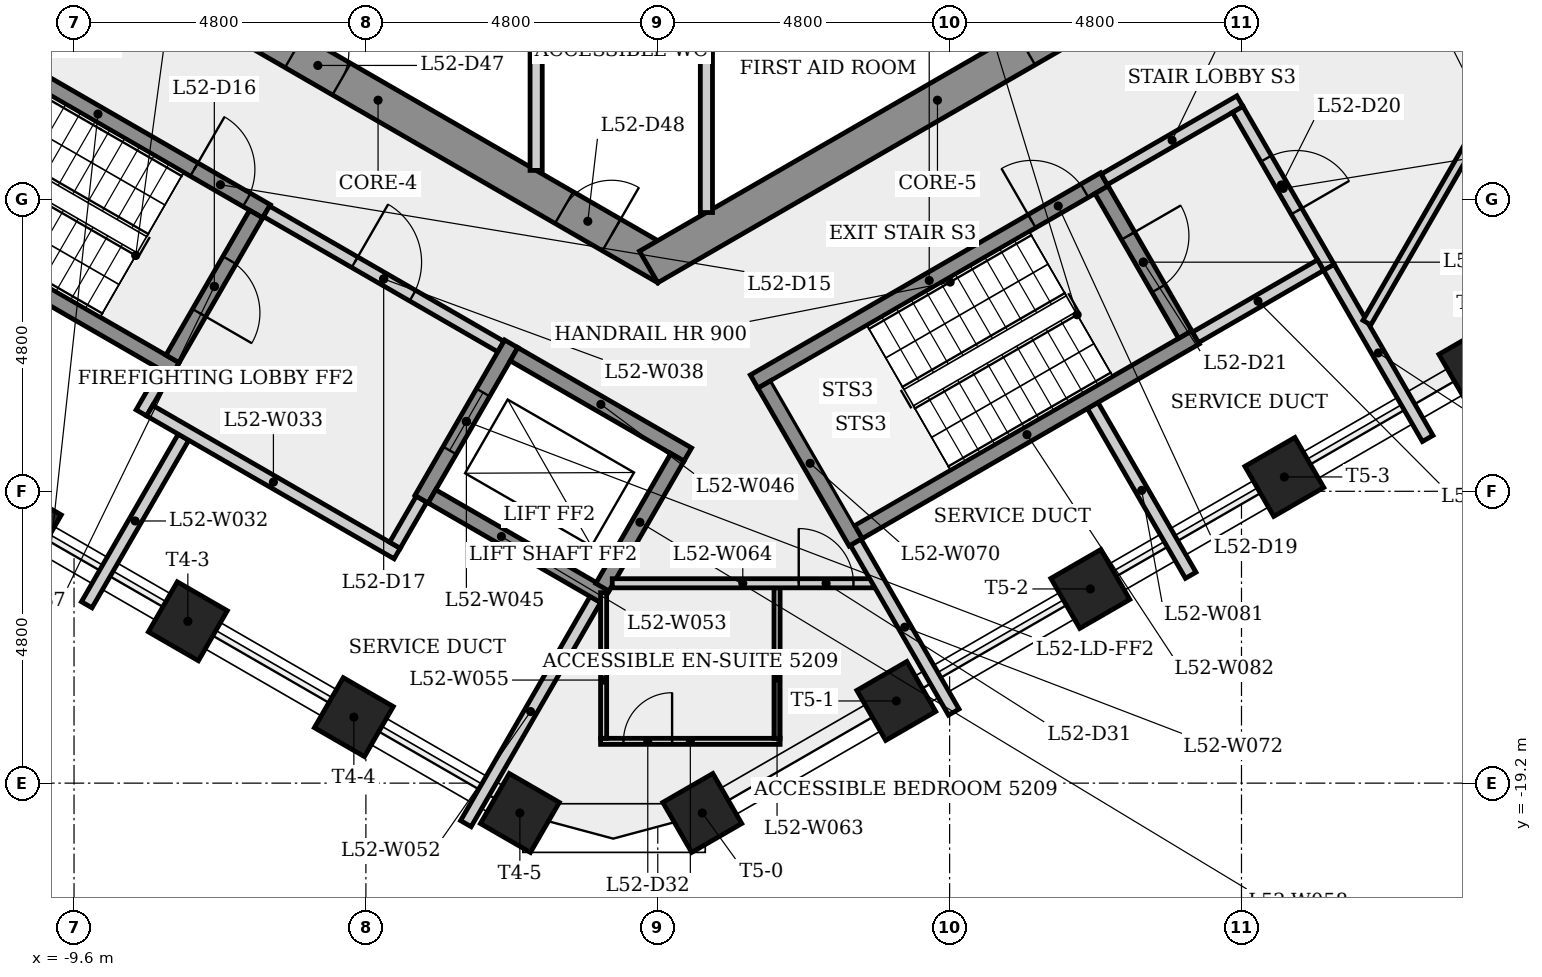
"""IFC4 building model, lengths in metres.
Left out: names, types, materials, properties, quantities, classifications, styles, units other than length and angle.
Written with IfcOpenShell. Run it as: python <this file> out.ifc"""

import sys

from ifc_helpers import new_model, si_unit, direction, frame, frame_2d, origin, origin_2d, place, context, subcontext, project, spatial, rectangle, extrude, element, fill, save


model = new_model("IFC4")
c1 = context("Model", 3, precision=1e-05, world=origin(), true_north=direction((0.0, 1.0)))
c2 = subcontext(c1, "Body", "Model", "MODEL_VIEW")
j1 = project(units=[si_unit("LENGTHUNIT", "METRE"), si_unit("PLANEANGLEUNIT", "RADIAN")], contexts=[c1])
p1 = place(None, origin())
s1 = spatial("IfcSite", under=j1, at=p1, CompositionType="ELEMENT")
p2 = place(p1, origin())
s2 = spatial("IfcBuilding", under=s1, at=p2, CompositionType="ELEMENT")
p3 = place(p2, frame((0.0, 0.0, 194.7)))
s3 = spatial("IfcBuildingStorey", under=s2, at=p3, CompositionType="ELEMENT", Elevation=194.7)
p4 = place(p3, frame((-9.35, -5.225, 0.0), z_axis=(0.0, 0.0, 1.0), x_axis=(0.866023993627, -0.500002442456, 0.0)))
e1 = element("IfcWall", 1, at=p4, inside=s3, PredefinedType="SHEAR", context=c2, shape_type="SweptSolid", body=[
    extrude(rectangle(XDim=10.97, YDim=0.6, at=frame_2d((5.485, 0.0))), origin(), (0.0, 0.0, 1.0), 4.0),
])
p5 = place(p4, frame((3.891, 0.0, 0.0)))
e2 = element("IfcOpeningElement", 2, at=p5, cuts=e1, PredefinedType="OPENING", context=c2, shape_type="SweptSolid", body=[
    extrude(rectangle(XDim=0.9, YDim=2.1, at=frame_2d((0.45, 1.05))), frame((0.0, 0.31, 0.0), z_axis=(0.0, -1.0, 0.0), x_axis=(1.0, 0.0, 0.0)), (0.0, 0.0, 1.0), 0.62),
])
p6 = place(p4, frame((9.018, 0.0, 0.0)))
e3 = element("IfcOpeningElement", 3, at=p6, cuts=e1, PredefinedType="OPENING", context=c2, shape_type="SweptSolid", body=[
    extrude(rectangle(XDim=0.9, YDim=2.1, at=frame_2d((0.45, 1.05))), frame((0.0, 0.31, 0.0), z_axis=(0.0, -1.0, 0.0), x_axis=(1.0, 0.0, 0.0)), (0.0, 0.0, 1.0), 0.62),
])
p7 = place(p3, frame((-0.15, -10.71, 0.0), z_axis=(0.0, 0.0, 1.0), x_axis=(0.866023993627, 0.500002442456, 0.0)))
e4 = element("IfcWall", 4, at=p7, inside=s3, PredefinedType="SHEAR", context=c2, shape_type="SweptSolid", body=[
    extrude(rectangle(XDim=10.97, YDim=0.6, at=frame_2d((5.485, 0.0))), origin(), (0.0, 0.0, 1.0), 4.0),
])
p8 = place(p7, frame((7.166, 0.0, 0.0)))
e5 = element("IfcOpeningElement", 5, at=p8, cuts=e4, PredefinedType="OPENING", context=c2, shape_type="SweptSolid", body=[
    extrude(rectangle(XDim=0.9, YDim=2.1, at=frame_2d((0.45, 1.05))), frame((0.0, 0.31, 0.0), z_axis=(0.0, -1.0, 0.0), x_axis=(1.0, 0.0, 0.0)), (0.0, 0.0, 1.0), 0.62),
])
for number, where, z_axis, x_axis in (
    (6, (-10.458, -14.962, 0.0), (0.0, 0.0, 1.0), (-0.5, -0.866, 0.0)),
    (7, (-7.728, -16.538, 0.0), (0.0, 0.0, 1.0), (-0.5, -0.866, 0.0)),
    (8, (-4.998, -18.114, 0.0), (0.0, 0.0, 1.0), (-0.5, -0.866, 0.0)),
    (9, (-2.268, -19.691, 0.0), (0.0, 0.0, 1.0), (-0.5, -0.866, 0.0)),
    (10, (0.732, -19.691, 0.0), (0.0, 0.0, 1.0), (0.5, -0.866, 0.0)),
    (11, (3.923, -17.848, 0.0), (0.0, 0.0, 1.0), (0.5, -0.866, 0.0)),
    (12, (7.114, -16.006, 0.0), (0.0, 0.0, 1.0), (0.5, -0.866, 0.0)),
    (13, (10.305, -14.164, 0.0), (0.0, 0.0, 1.0), (0.5, -0.866, 0.0)),
    (14, (13.496, -12.322, 0.0), (0.0, 0.0, 1.0), (0.5, -0.866, 0.0)),
):
    element("IfcColumn", number, at=place(p3, frame(where, z_axis=z_axis, x_axis=x_axis)), inside=s3, PredefinedType="COLUMN", context=c2, shape_type="SweptSolid", body=[
        extrude(rectangle(XDim=0.95, YDim=0.95, at=origin_2d()), origin(), (0.0, 0.0, 1.0), 4.0),
    ])
p9 = place(p3, frame((-11.977, -6.595, 0.0), z_axis=(0.0, 0.0, 1.0), x_axis=(0.866025499775, -0.499999833739, 0.0)))
e15 = element("IfcWall", 15, at=p9, inside=s3, PredefinedType="SHEAR", context=c2, shape_type="SweptSolid", body=[
    extrude(rectangle(XDim=6.4, YDim=0.25, at=frame_2d((3.2, 0.0))), origin(), (0.0, 0.0, 1.0), 3.65),
])
p10 = place(p9, frame((5.025, 0.0, 0.0)))
e16 = element("IfcOpeningElement", 16, at=p10, cuts=e15, PredefinedType="OPENING", context=c2, shape_type="SweptSolid", body=[
    extrude(rectangle(XDim=1.0, YDim=2.1, at=frame_2d((0.5, 1.05))), frame((0.0, 0.135, 0.0), z_axis=(0.0, -1.0, 0.0), x_axis=(1.0, 0.0, 0.0)), (0.0, 0.0, 1.0), 0.27),
])
p11 = place(p3, frame((-8.493, -13.11, 0.0), z_axis=(0.0, 0.0, 1.0), x_axis=(0.500067724834, 0.865986299303, 0.0)))
e17 = element("IfcWall", 17, at=p11, inside=s3, PredefinedType="PLUMBINGWALL", context=c2, shape_type="SweptSolid", body=[
    extrude(rectangle(XDim=0.775, YDim=0.2, at=frame_2d((0.388, 0.0))), origin(), (0.0, 0.0, 1.0), 3.65),
])
p12 = place(p3, frame((-7.935, -12.393, 0.0), z_axis=(0.0, 0.0, 1.0), x_axis=(-0.866025499775, 0.499999833739, 0.0)))
e18 = element("IfcWall", 18, at=p12, inside=s3, PredefinedType="SHEAR", context=c2, shape_type="SweptSolid", body=[
    extrude(rectangle(XDim=6.4, YDim=0.25, at=frame_2d((3.2, 0.0))), origin(), (0.0, 0.0, 1.0), 3.65),
])
p13 = place(p3, frame((-7.8, -13.51, 0.0), z_axis=(0.0, 0.0, 1.0), x_axis=(-0.500016846771, -0.866015677078, 0.0)))
e19 = element("IfcWall", 19, at=p13, inside=s3, PredefinedType="PLUMBINGWALL", context=c2, shape_type="SweptSolid", body=[
    extrude(rectangle(XDim=3.183, YDim=0.2, at=frame_2d((1.591, 0.0))), origin(), (0.0, 0.0, 1.0), 3.65),
])
p14 = place(p3, frame((-8.356, -13.073, 0.0), z_axis=(0.0, 0.0, 1.0), x_axis=(0.866038532462, -0.499977259774, 0.0)))
e20 = element("IfcWall", 20, at=p14, inside=s3, PredefinedType="PLUMBINGWALL", context=c2, shape_type="SweptSolid", body=[
    extrude(rectangle(XDim=4.7, YDim=0.2, at=frame_2d((2.35, 0.0))), origin(), (0.0, 0.0, 1.0), 3.65),
])
p15 = place(p3, frame((-6.605, -9.841, 0.0), z_axis=(0.0, 0.0, 1.0), x_axis=(-0.499996545922, -0.866027397988, 0.0)))
e21 = element("IfcWall", 21, at=p15, inside=s3, PredefinedType="SHEAR", context=c2, shape_type="SweptSolid", body=[
    extrude(rectangle(XDim=2.75, YDim=0.25, at=frame_2d((1.375, 0.0))), origin(), (0.0, 0.0, 1.0), 3.65),
])
p16 = place(p15, frame((0.875, 0.0, 0.0)))
e22 = element("IfcOpeningElement", 22, at=p16, cuts=e21, PredefinedType="OPENING", context=c2, shape_type="SweptSolid", body=[
    extrude(rectangle(XDim=1.0, YDim=2.1, at=frame_2d((0.5, 1.05))), frame((0.0, 0.135, 0.0), z_axis=(0.0, -1.0, 0.0), x_axis=(1.0, 0.0, 0.0)), (0.0, 0.0, 1.0), 0.27),
])
p17 = place(p3, frame((-6.435, -9.795, 0.0), z_axis=(0.0, 0.0, 1.0), x_axis=(0.866012907634, -0.500021643343, 0.0)))
e23 = element("IfcWall", 23, at=p17, inside=s3, PredefinedType="PARTITIONING", context=c2, shape_type="SweptSolid", body=[
    extrude(rectangle(XDim=4.45, YDim=0.2, at=frame_2d((2.225, 0.0))), origin(), (0.0, 0.0, 1.0), 3.65),
])
p18 = place(p17, frame((1.675, 0.0, 0.0)))
e24 = element("IfcOpeningElement", 24, at=p18, cuts=e23, PredefinedType="OPENING", context=c2, shape_type="SweptSolid", body=[
    extrude(rectangle(XDim=1.1, YDim=2.1, at=frame_2d((0.55, 1.05))), frame((0.0, 0.11, 0.0), z_axis=(0.0, -1.0, 0.0), x_axis=(1.0, 0.0, 0.0)), (0.0, 0.0, 1.0), 0.22),
])
p19 = place(p3, frame((-3.885, -14.529, 0.0), z_axis=(0.0, 0.0, 1.0), x_axis=(-0.499859285417, -0.866106630146, 0.0)))
e25 = element("IfcWall", 25, at=p19, inside=s3, PredefinedType="PLUMBINGWALL", context=c2, shape_type="SweptSolid", body=[
    extrude(rectangle(XDim=0.875, YDim=0.2, at=frame_2d((0.438, 0.0))), origin(), (0.0, 0.0, 1.0), 3.65),
])
p20 = place(p3, frame((-2.41, -11.974, 0.0), z_axis=(0.0, 0.0, 1.0), x_axis=(-0.500001826776, -0.866024349092, 0.0)))
e26 = element("IfcWall", 26, at=p20, inside=s3, PredefinedType="SHEAR", context=c2, shape_type="SweptSolid", body=[
    extrude(rectangle(XDim=2.95, YDim=0.25, at=frame_2d((1.475, 0.0))), origin(), (0.0, 0.0, 1.0), 3.65),
])
p21 = place(p20, frame((0.925, 0.0, 0.0)))
e27 = element("IfcOpeningElement", 27, at=p21, cuts=e26, PredefinedType="OPENING", context=c2, shape_type="SweptSolid", body=[
    extrude(rectangle(XDim=1.1, YDim=2.1, at=frame_2d((0.55, 1.05))), frame((0.0, 0.135, 0.0), z_axis=(0.0, -1.0, 0.0), x_axis=(1.0, 0.0, 0.0)), (0.0, 0.0, 1.0), 0.27),
])
p22 = place(p3, frame((-2.364, -12.145, 0.0), z_axis=(0.0, 0.0, 1.0), x_axis=(0.866040211805, -0.499974350878, 0.0)))
e28 = element("IfcWall", 28, at=p22, inside=s3, PredefinedType="SHEAR", context=c2, shape_type="SweptSolid", body=[
    extrude(rectangle(XDim=3.3, YDim=0.25, at=frame_2d((1.65, 0.0))), origin(), (0.0, 0.0, 1.0), 3.65),
])
p23 = place(p3, frame((-2.0, -5.25, 0.0), z_axis=(0.0, 0.0, 1.0), x_axis=(0.0, -1.0, 0.0)))
e29 = element("IfcWall", 29, at=p23, inside=s3, PredefinedType="PARTITIONING", context=c2, shape_type="SweptSolid", body=[
    extrude(rectangle(XDim=3.872, YDim=0.2, at=frame_2d((1.936, 0.0))), origin(), (0.0, 0.0, 1.0), 3.65),
])
p24 = place(p3, frame((-1.027, -16.179, 0.0), z_axis=(0.0, 0.0, 1.0), x_axis=(-0.500011993549, -0.866018479195, 0.0)))
e30 = element("IfcWall", 30, at=p24, inside=s3, PredefinedType="PLUMBINGWALL", context=c2, shape_type="SweptSolid", body=[
    extrude(rectangle(XDim=4.258, YDim=0.2, at=frame_2d((2.129, 0.0))), origin(), (0.0, 0.0, 1.0), 3.65),
])
p25 = place(p3, frame((-0.856, -16.133, 0.0), z_axis=(0.0, 0.0, 1.0), x_axis=(-0.866021716278, 0.500006386895, 0.0)))
e31 = element("IfcWall", 31, at=p25, inside=s3, PredefinedType="SHEAR", context=c2, shape_type="SweptSolid", body=[
    extrude(rectangle(XDim=3.3, YDim=0.25, at=frame_2d((1.65, 0.0))), origin(), (0.0, 0.0, 1.0), 3.65),
])
p26 = place(p3, frame((-0.941, -18.513, 0.0), z_axis=(0.0, 0.0, 1.0), x_axis=(1.0, 0.0, 0.0)))
e32 = element("IfcWall", 32, at=p26, inside=s3, PredefinedType="PARTITIONING", context=c2, shape_type="SweptSolid", body=[
    extrude(rectangle(XDim=2.953, YDim=0.1, at=frame_2d((1.476, 0.0))), origin(), (0.0, 0.0, 1.0), 3.65),
])
p27 = place(p26, frame((0.376, 0.0, 0.0)))
e33 = element("IfcOpeningElement", 33, at=p27, cuts=e32, PredefinedType="OPENING", context=c2, shape_type="SweptSolid", body=[
    extrude(rectangle(XDim=0.8, YDim=2.1, at=frame_2d((0.4, 1.05))), frame((0.0, 0.06, 0.0), z_axis=(0.0, -1.0, 0.0), x_axis=(1.0, 0.0, 0.0)), (0.0, 0.0, 1.0), 0.12),
])
p28 = place(p3, frame((-0.891, -16.068, 0.0), z_axis=(0.0, 0.0, 1.0), x_axis=(0.0, -1.0, 0.0)))
e34 = element("IfcWall", 34, at=p28, inside=s3, PredefinedType="PARTITIONING", context=c2, shape_type="SweptSolid", body=[
    extrude(rectangle(XDim=2.395, YDim=0.1, at=frame_2d((1.198, 0.0))), origin(), (0.0, 0.0, 1.0), 3.65),
])
p29 = place(p3, frame((0.323, -13.841, 0.0), z_axis=(0.0, 0.0, 1.0), x_axis=(-0.500033620833, -0.866005991917, 0.0)))
e35 = element("IfcWall", 35, at=p29, inside=s3, PredefinedType="SHEAR", context=c2, shape_type="SweptSolid", body=[
    extrude(rectangle(XDim=2.468, YDim=0.25, at=frame_2d((1.234, 0.0))), origin(), (0.0, 0.0, 1.0), 4.0),
])
p30 = place(p3, frame((0.8, -5.25, 0.0), z_axis=(0.0, 0.0, 1.0), x_axis=(0.0, -1.0, 0.0)))
e36 = element("IfcWall", 36, at=p30, inside=s3, PredefinedType="PARTITIONING", context=c2, shape_type="SweptSolid", body=[
    extrude(rectangle(XDim=4.565, YDim=0.2, at=frame_2d((2.282, 0.0))), origin(), (0.0, 0.0, 1.0), 3.65),
])
p31 = place(p3, frame((1.585, -12.595, 0.0), z_axis=(0.0, 0.0, 1.0), x_axis=(0.866036417653, 0.499980922934, 0.0)))
e37 = element("IfcWall", 37, at=p31, inside=s3, PredefinedType="SHEAR", context=c2, shape_type="SweptSolid", body=[
    extrude(rectangle(XDim=6.65, YDim=0.25, at=frame_2d((3.325, 0.0))), origin(), (0.0, 0.0, 1.0), 3.65),
])
p32 = place(p31, frame((5.275, 0.0, 0.0)))
e38 = element("IfcOpeningElement", 38, at=p32, cuts=e37, PredefinedType="OPENING", context=c2, shape_type="SweptSolid", body=[
    extrude(rectangle(XDim=1.0, YDim=2.1, at=frame_2d((0.5, 1.05))), frame((0.0, 0.135, 0.0), z_axis=(0.0, -1.0, 0.0), x_axis=(1.0, 0.0, 0.0)), (0.0, 0.0, 1.0), 0.27),
])
p33 = place(p3, frame((1.962, -18.463, 0.0), z_axis=(0.0, 0.0, 1.0), x_axis=(0.0, 1.0, 0.0)))
e39 = element("IfcWall", 39, at=p33, inside=s3, PredefinedType="PARTITIONING", context=c2, shape_type="SweptSolid", body=[
    extrude(rectangle(XDim=2.475, YDim=0.1, at=frame_2d((1.238, 0.0))), origin(), (0.0, 0.0, 1.0), 3.65),
])
p34 = place(p3, frame((-0.748, -15.913, 0.0), z_axis=(0.0, 0.0, 1.0), x_axis=(1.0, 0.0, 0.0)))
e40 = element("IfcWall", 40, at=p34, inside=s3, PredefinedType="PARTITIONING", context=c2, shape_type="SweptSolid", body=[
    extrude(rectangle(XDim=4.293, YDim=0.15, at=frame_2d((2.146, 0.0))), origin(), (0.0, 0.0, 1.0), 3.65),
])
p35 = place(p34, frame((3.067, 0.0, 0.0)))
e41 = element("IfcOpeningElement", 41, at=p35, cuts=e40, PredefinedType="OPENING", context=c2, shape_type="SweptSolid", body=[
    extrude(rectangle(XDim=0.9, YDim=2.1, at=frame_2d((0.45, 1.05))), frame((0.0, 0.085, 0.0), z_axis=(0.0, -1.0, 0.0), x_axis=(1.0, 0.0, 0.0)), (0.0, 0.0, 1.0), 0.17),
])
p36 = place(p3, frame((3.256, -15.239, 0.0), z_axis=(0.0, 0.0, 1.0), x_axis=(-0.50002537861, 0.866010750942, 0.0)))
e42 = element("IfcWall", 42, at=p36, inside=s3, PredefinedType="SHEAR", context=c2, shape_type="SweptSolid", body=[
    extrude(rectangle(XDim=3.0, YDim=0.25, at=frame_2d((1.5, 0.0))), origin(), (0.0, 0.0, 1.0), 3.65),
])
for number, where, z_axis, x_axis in (
    (43, (3.256, -15.239, 0.0), (0.0, 0.0, 1.0), (0.5, -0.866, 0.0)),
    (44, (7.153, -12.989, 0.0), (0.0, 0.0, 1.0), (0.5, -0.866, 0.0)),
):
    element("IfcWall", number, at=place(p3, frame(where, z_axis=z_axis, x_axis=x_axis)), inside=s3, PredefinedType="PLUMBINGWALL", context=c2, shape_type="SweptSolid", body=[
        extrude(rectangle(XDim=3.225, YDim=0.2, at=frame_2d((1.612, 0.0))), origin(), (0.0, 0.0, 1.0), 3.65),
    ])
p37 = place(p3, frame((3.301, -15.068, 0.0), z_axis=(0.0, 0.0, 1.0), x_axis=(0.866035036182, 0.499983315828, 0.0)))
e45 = element("IfcWall", 45, at=p37, inside=s3, PredefinedType="SHEAR", context=c2, shape_type="SweptSolid", body=[
    extrude(rectangle(XDim=6.4, YDim=0.25, at=frame_2d((3.2, 0.0))), origin(), (0.0, 0.0, 1.0), 3.65),
])
p38 = place(p3, frame((7.298, -9.441, 0.0), z_axis=(0.0, 0.0, 1.0), x_axis=(0.500034990121, -0.866005201286, 0.0)))
e46 = element("IfcWall", 46, at=p38, inside=s3, PredefinedType="SHEAR", context=c2, shape_type="SweptSolid", body=[
    extrude(rectangle(XDim=2.75, YDim=0.25, at=frame_2d((1.375, 0.0))), origin(), (0.0, 0.0, 1.0), 3.65),
])
p39 = place(p38, frame((0.875, 0.0, 0.0)))
e47 = element("IfcOpeningElement", 47, at=p39, cuts=e46, PredefinedType="OPENING", context=c2, shape_type="SweptSolid", body=[
    extrude(rectangle(XDim=1.0, YDim=2.1, at=frame_2d((0.5, 1.05))), frame((0.0, 0.135, 0.0), z_axis=(0.0, -1.0, 0.0), x_axis=(1.0, 0.0, 0.0)), (0.0, 0.0, 1.0), 0.27),
])
p40 = place(p3, frame((7.344, -9.27, 0.0), z_axis=(0.0, 0.0, 1.0), x_axis=(0.866005588531, 0.500034319456, 0.0)))
e48 = element("IfcWall", 48, at=p40, inside=s3, PredefinedType="PARTITIONING", context=c2, shape_type="SweptSolid", body=[
    extrude(rectangle(XDim=2.575, YDim=0.2, at=frame_2d((1.288, 0.0))), origin(), (0.0, 0.0, 1.0), 3.65),
])
p41 = place(p3, frame((9.537, -8.119, 0.0), z_axis=(0.0, 0.0, 1.0), x_axis=(0.499990139034, -0.866031096941, 0.0)))
e49 = element("IfcWall", 49, at=p41, inside=s3, PredefinedType="PARTITIONING", context=c2, shape_type="SweptSolid", body=[
    extrude(rectangle(XDim=3.0, YDim=0.2, at=frame_2d((1.5, 0.0))), origin(), (0.0, 0.0, 1.0), 3.65),
])
p42 = place(p41, frame((0.935, 0.0, 0.0)))
e50 = element("IfcOpeningElement", 50, at=p42, cuts=e49, PredefinedType="OPENING", context=c2, shape_type="SweptSolid", body=[
    extrude(rectangle(XDim=1.0, YDim=2.1, at=frame_2d((0.5, 1.05))), frame((0.0, 0.11, 0.0), z_axis=(0.0, -1.0, 0.0), x_axis=(1.0, 0.0, 0.0)), (0.0, 0.0, 1.0), 0.22),
])
p43 = place(p3, frame((10.901, -10.681, 0.0), z_axis=(0.0, 0.0, 1.0), x_axis=(-0.866007538022, -0.500030943131, 0.0)))
e51 = element("IfcWall", 51, at=p43, inside=s3, PredefinedType="PLUMBINGWALL", context=c2, shape_type="SweptSolid", body=[
    extrude(rectangle(XDim=2.375, YDim=0.2, at=frame_2d((1.188, 0.0))), origin(), (0.0, 0.0, 1.0), 3.65),
])
p44 = place(p3, frame((11.037, -10.717, 0.0), z_axis=(0.0, 0.0, 1.0), x_axis=(0.500025966412, -0.86601041155, 0.0)))
e52 = element("IfcWall", 52, at=p44, inside=s3, PredefinedType="PLUMBINGWALL", context=c2, shape_type="SweptSolid", body=[
    extrude(rectangle(XDim=3.249, YDim=0.2, at=frame_2d((1.625, 0.0))), origin(), (0.0, 0.0, 1.0), 3.65),
])
p45 = place(p3, frame((15.593, -4.818, 0.0), z_axis=(0.0, 0.0, 1.0), x_axis=(-0.500000242082, -0.866025264018, 0.0)))
e53 = element("IfcWall", 53, at=p45, inside=s3, PredefinedType="PARTITIONING", context=c2, shape_type="SweptSolid", body=[
    extrude(rectangle(XDim=7.861, YDim=0.15, at=frame_2d((3.931, 0.0))), origin(), (0.0, 0.0, 1.0), 3.65),
])
p46 = place(p45, frame((3.431, 0.0, 0.0)))
e54 = element("IfcOpeningElement", 54, at=p46, cuts=e53, PredefinedType="OPENING", context=c2, shape_type="SweptSolid", body=[
    extrude(rectangle(XDim=1.0, YDim=2.1, at=frame_2d((0.5, 1.05))), frame((0.0, 0.085, 0.0), z_axis=(0.0, -1.0, 0.0), x_axis=(1.0, 0.0, 0.0)), (0.0, 0.0, 1.0), 0.17),
])
p47 = place(p10, origin())
e55 = element("IfcDoor", 55, at=p47, inside=s3, OperationType="SINGLE_SWING_LEFT", PredefinedType="DOOR", context=c2, shape_type="SweptSolid", body=[
    extrude(rectangle(XDim=1.0, YDim=2.1, at=frame_2d((0.5, 1.05))), frame((0.0, 0.025, 0.0), z_axis=(0.0, -1.0, 0.0), x_axis=(1.0, 0.0, 0.0)), (0.0, 0.0, 1.0), 0.05),
])
fill(e16, e55)
p48 = place(p16, origin())
e56 = element("IfcDoor", 56, at=p48, inside=s3, OperationType="SINGLE_SWING_RIGHT", PredefinedType="DOOR", context=c2, shape_type="SweptSolid", body=[
    extrude(rectangle(XDim=1.0, YDim=2.1, at=frame_2d((0.5, 1.05))), frame((0.0, 0.025, 0.0), z_axis=(0.0, -1.0, 0.0), x_axis=(1.0, 0.0, 0.0)), (0.0, 0.0, 1.0), 0.05),
])
fill(e22, e56)
p49 = place(p18, origin())
e57 = element("IfcDoor", 57, at=p49, inside=s3, OperationType="SINGLE_SWING_LEFT", PredefinedType="DOOR", context=c2, shape_type="SweptSolid", body=[
    extrude(rectangle(XDim=1.1, YDim=2.1, at=frame_2d((0.55, 1.05))), frame((0.0, 0.025, 0.0), z_axis=(0.0, -1.0, 0.0), x_axis=(1.0, 0.0, 0.0)), (0.0, 0.0, 1.0), 0.05),
])
fill(e24, e57)
p50 = place(p21, origin())
e58 = element("IfcDoor", 58, at=p50, inside=s3, OperationType="SLIDING_TO_LEFT", PredefinedType="DOOR", context=c2, shape_type="SweptSolid", body=[
    extrude(rectangle(XDim=1.1, YDim=2.1, at=frame_2d((0.55, 1.05))), frame((0.0, 0.025, 0.0), z_axis=(0.0, -1.0, 0.0), x_axis=(1.0, 0.0, 0.0)), (0.0, 0.0, 1.0), 0.05),
])
fill(e27, e58)
p51 = place(p32, origin())
e59 = element("IfcDoor", 59, at=p51, inside=s3, OperationType="SINGLE_SWING_LEFT", PredefinedType="DOOR", context=c2, shape_type="SweptSolid", body=[
    extrude(rectangle(XDim=1.0, YDim=2.1, at=frame_2d((0.5, 1.05))), frame((0.0, 0.025, 0.0), z_axis=(0.0, -1.0, 0.0), x_axis=(1.0, 0.0, 0.0)), (0.0, 0.0, 1.0), 0.05),
])
fill(e38, e59)
p52 = place(p42, origin())
e60 = element("IfcDoor", 60, at=p52, inside=s3, OperationType="SINGLE_SWING_RIGHT", PredefinedType="DOOR", context=c2, shape_type="SweptSolid", body=[
    extrude(rectangle(XDim=1.0, YDim=2.1, at=frame_2d((0.5, 1.05))), frame((0.0, 0.025, 0.0), z_axis=(0.0, -1.0, 0.0), x_axis=(1.0, 0.0, 0.0)), (0.0, 0.0, 1.0), 0.05),
])
fill(e50, e60)
p53 = place(p39, origin())
e61 = element("IfcDoor", 61, at=p53, inside=s3, OperationType="SINGLE_SWING_LEFT", PredefinedType="DOOR", context=c2, shape_type="SweptSolid", body=[
    extrude(rectangle(XDim=1.0, YDim=2.1, at=frame_2d((0.5, 1.05))), frame((0.0, 0.025, 0.0), z_axis=(0.0, -1.0, 0.0), x_axis=(1.0, 0.0, 0.0)), (0.0, 0.0, 1.0), 0.05),
])
fill(e47, e61)
p54 = place(p35, origin())
e62 = element("IfcDoor", 62, at=p54, inside=s3, OperationType="SINGLE_SWING_LEFT", PredefinedType="DOOR", context=c2, shape_type="SweptSolid", body=[
    extrude(rectangle(XDim=0.9, YDim=2.1, at=frame_2d((0.45, 1.05))), frame((0.0, 0.025, 0.0), z_axis=(0.0, -1.0, 0.0), x_axis=(1.0, 0.0, 0.0)), (0.0, 0.0, 1.0), 0.05),
])
fill(e41, e62)
p55 = place(p27, origin())
e63 = element("IfcDoor", 63, at=p55, inside=s3, OperationType="SINGLE_SWING_RIGHT", PredefinedType="DOOR", context=c2, shape_type="SweptSolid", body=[
    extrude(rectangle(XDim=0.8, YDim=2.1, at=frame_2d((0.4, 1.05))), frame((0.0, 0.025, 0.0), z_axis=(0.0, -1.0, 0.0), x_axis=(1.0, 0.0, 0.0)), (0.0, 0.0, 1.0), 0.05),
])
fill(e33, e63)
p56 = place(p5, origin())
e64 = element("IfcDoor", 64, at=p56, inside=s3, OperationType="SINGLE_SWING_LEFT", PredefinedType="DOOR", context=c2, shape_type="SweptSolid", body=[
    extrude(rectangle(XDim=0.9, YDim=2.1, at=frame_2d((0.45, 1.05))), frame((0.0, 0.025, 0.0), z_axis=(0.0, -1.0, 0.0), x_axis=(1.0, 0.0, 0.0)), (0.0, 0.0, 1.0), 0.05),
])
fill(e2, e64)
p57 = place(p6, origin())
e65 = element("IfcDoor", 65, at=p57, inside=s3, OperationType="SINGLE_SWING_RIGHT", PredefinedType="DOOR", context=c2, shape_type="SweptSolid", body=[
    extrude(rectangle(XDim=0.9, YDim=2.1, at=frame_2d((0.45, 1.05))), frame((0.0, 0.025, 0.0), z_axis=(0.0, -1.0, 0.0), x_axis=(1.0, 0.0, 0.0)), (0.0, 0.0, 1.0), 0.05),
])
fill(e3, e65)
save(model, sys.argv[1])
